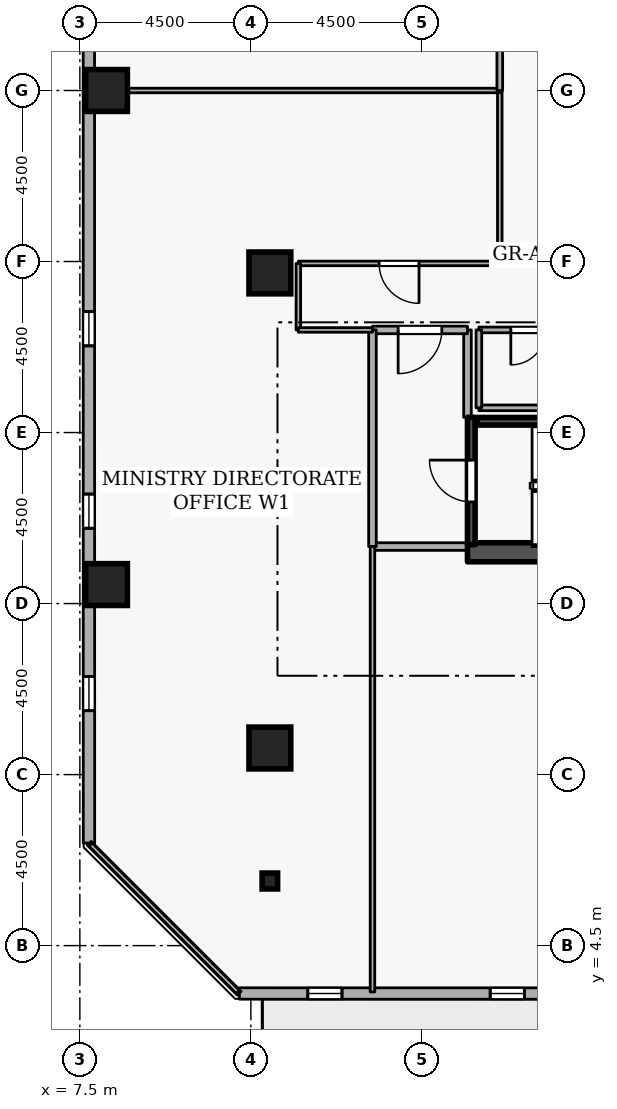
"""IFC4 building model, lengths in metres.
Left out: names, types, materials, properties, quantities, classifications, styles, units other than length and angle.
Written with IfcOpenShell. Run it as: python <this file> out.ifc"""

import sys

from ifc_helpers import new_model, si_unit, direction, frame, frame_2d, origin, origin_2d, place, context, subcontext, project, spatial, rectangle, i_section, extrude, element, fill, save


model = new_model("IFC4")
c1 = context("Model", 3, precision=1e-05, world=origin(), true_north=direction((0.0, 1.0)))
c2 = subcontext(c1, "Body", "Model", "MODEL_VIEW")
j1 = project(units=[si_unit("LENGTHUNIT", "METRE"), si_unit("PLANEANGLEUNIT", "RADIAN")], contexts=[c1])
p1 = place(None, origin())
s1 = spatial("IfcSite", under=j1, at=p1, CompositionType="ELEMENT")
p2 = place(p1, origin())
s2 = spatial("IfcBuilding", under=s1, at=p2, CompositionType="ELEMENT")
p3 = place(p2, frame((0.0, 0.0, 152.7)))
s3 = spatial("IfcBuildingStorey", under=s2, at=p3, CompositionType="ELEMENT", Elevation=152.7)
p4 = place(p3, frame((17.7, 14.85, 0.0), z_axis=(0.0, 0.0, 1.0), x_axis=(1.0, 0.0, 0.0)))
e1 = element("IfcWall", 1, at=p4, inside=s3, PredefinedType="SHEAR", context=c2, shape_type="SweptSolid", body=[
    extrude(rectangle(XDim=15.6, YDim=0.5, at=frame_2d((7.8, 0.0))), origin(), (0.0, 0.0, 1.0), 3.6),
])
for number, where, z_axis, x_axis in (
    (2, (12.5, 9.7, 0.0), (0.0, 0.0, 1.0), (1.0, 0.0, 0.0)),
    (3, (8.2, 14.0, 0.0), (0.0, 0.0, 1.0), (1.0, 0.0, 0.0)),
    (4, (8.2, 27.0, 0.0), (0.0, 0.0, 1.0), (1.0, 0.0, 0.0)),
    (5, (12.5, 22.2, 0.0), (0.0, 0.0, 1.0), (1.0, 0.0, 0.0)),
):
    element("IfcColumn", number, at=place(p3, frame(where, z_axis=z_axis, x_axis=x_axis)), inside=s3, PredefinedType="COLUMN", context=c2, shape_type="SweptSolid", body=[
        extrude(rectangle(XDim=1.1, YDim=1.1, at=origin_2d()), origin(), (0.0, 0.0, 1.0), 3.6),
    ])
p5 = place(p3, frame((12.5, 6.2, 0.0), z_axis=(0.0, 0.0, 1.0), x_axis=(1.0, 0.0, 0.0)))
e6 = element("IfcColumn", 6, at=p5, inside=s3, PredefinedType="COLUMN", context=c2, shape_type="SweptSolid", body=[
    extrude(i_section(OverallWidth=0.407, OverallDepth=0.419, WebThickness=0.031, FlangeThickness=0.049, FilletRadius=0.015, at=origin_2d()), origin(), (0.0, 0.0, 1.0), 3.6),
])
p6 = place(p3, frame((11.698, 3.24, 0.0), z_axis=(0.0, 0.0, 1.0), x_axis=(0.999999991209, -0.000132597301, 0.0)))
e7 = element("IfcWall", 7, at=p6, inside=s3, PredefinedType="STANDARD", context=c2, shape_type="SweptSolid", body=[
    extrude(rectangle(XDim=34.983, YDim=0.3, at=frame_2d((17.492, 0.0))), origin(), (0.0, 0.0, 1.0), 2.7),
])
p7 = place(p6, frame((21.992, 0.0, 0.0)))
e8 = element("IfcOpeningElement", 8, at=p7, cuts=e7, PredefinedType="OPENING", context=c2, shape_type="SweptSolid", body=[
    extrude(rectangle(XDim=1.0, YDim=2.08, at=frame_2d((0.5, 1.04))), frame((0.0, 0.16, 0.0), z_axis=(0.0, -1.0, 0.0), x_axis=(1.0, 0.0, 0.0)), (0.0, 0.0, 1.0), 0.32),
])
p8 = place(p6, frame((1.8, 0.0, 0.72)))
e9 = element("IfcOpeningElement", 9, at=p8, cuts=e7, PredefinedType="OPENING", context=c2, shape_type="SweptSolid", body=[
    extrude(rectangle(XDim=0.9, YDim=1.75, at=frame_2d((0.45, 0.875))), frame((0.0, 0.16, 0.0), z_axis=(0.0, -1.0, 0.0), x_axis=(1.0, 0.0, 0.0)), (0.0, 0.0, 1.0), 0.32),
])
p9 = place(p6, frame((6.6, 0.0, 0.72)))
e10 = element("IfcOpeningElement", 10, at=p9, cuts=e7, PredefinedType="OPENING", context=c2, shape_type="SweptSolid", body=[
    extrude(rectangle(XDim=0.9, YDim=1.75, at=frame_2d((0.45, 0.875))), frame((0.0, 0.16, 0.0), z_axis=(0.0, -1.0, 0.0), x_axis=(1.0, 0.0, 0.0)), (0.0, 0.0, 1.0), 0.32),
])
p10 = place(p6, frame((11.4, 0.0, 0.72)))
e11 = element("IfcOpeningElement", 11, at=p10, cuts=e7, PredefinedType="OPENING", context=c2, shape_type="SweptSolid", body=[
    extrude(rectangle(XDim=0.9, YDim=1.75, at=frame_2d((0.45, 0.875))), frame((0.0, 0.16, 0.0), z_axis=(0.0, -1.0, 0.0), x_axis=(1.0, 0.0, 0.0)), (0.0, 0.0, 1.0), 0.32),
])
p11 = place(p6, frame((16.2, 0.0, 0.72)))
e12 = element("IfcOpeningElement", 12, at=p11, cuts=e7, PredefinedType="OPENING", context=c2, shape_type="SweptSolid", body=[
    extrude(rectangle(XDim=0.9, YDim=1.75, at=frame_2d((0.45, 0.875))), frame((0.0, 0.16, 0.0), z_axis=(0.0, -1.0, 0.0), x_axis=(1.0, 0.0, 0.0)), (0.0, 0.0, 1.0), 0.32),
])
p12 = place(p6, frame((25.8, 0.0, 0.72)))
e13 = element("IfcOpeningElement", 13, at=p12, cuts=e7, PredefinedType="OPENING", context=c2, shape_type="SweptSolid", body=[
    extrude(rectangle(XDim=0.9, YDim=1.75, at=frame_2d((0.45, 0.875))), frame((0.0, 0.16, 0.0), z_axis=(0.0, -1.0, 0.0), x_axis=(1.0, 0.0, 0.0)), (0.0, 0.0, 1.0), 0.32),
])
p13 = place(p6, frame((30.6, 0.0, 0.72)))
e14 = element("IfcOpeningElement", 14, at=p13, cuts=e7, PredefinedType="OPENING", context=c2, shape_type="SweptSolid", body=[
    extrude(rectangle(XDim=0.9, YDim=1.75, at=frame_2d((0.45, 0.875))), frame((0.0, 0.16, 0.0), z_axis=(0.0, -1.0, 0.0), x_axis=(1.0, 0.0, 0.0)), (0.0, 0.0, 1.0), 0.32),
])
p14 = place(p3, frame((7.735, 42.181, 0.0), z_axis=(0.0, 0.0, 1.0), x_axis=(0.000132597301, -0.999999991209, 0.0)))
e15 = element("IfcWall", 15, at=p14, inside=s3, PredefinedType="STANDARD", context=c2, shape_type="SweptSolid", body=[
    extrude(rectangle(XDim=34.983, YDim=0.3, at=frame_2d((17.492, 0.0))), origin(), (0.0, 0.0, 1.0), 2.7),
])
p15 = place(p14, frame((6.6, 0.0, 0.72)))
e16 = element("IfcOpeningElement", 16, at=p15, cuts=e15, PredefinedType="OPENING", context=c2, shape_type="SweptSolid", body=[
    extrude(rectangle(XDim=0.9, YDim=1.75, at=frame_2d((0.45, 0.875))), frame((0.0, 0.16, 0.0), z_axis=(0.0, -1.0, 0.0), x_axis=(1.0, 0.0, 0.0)), (0.0, 0.0, 1.0), 0.32),
])
p16 = place(p14, frame((11.4, 0.0, 0.72)))
e17 = element("IfcOpeningElement", 17, at=p16, cuts=e15, PredefinedType="OPENING", context=c2, shape_type="SweptSolid", body=[
    extrude(rectangle(XDim=0.9, YDim=1.75, at=frame_2d((0.45, 0.875))), frame((0.0, 0.16, 0.0), z_axis=(0.0, -1.0, 0.0), x_axis=(1.0, 0.0, 0.0)), (0.0, 0.0, 1.0), 0.32),
])
p17 = place(p14, frame((21.0, 0.0, 0.72)))
e18 = element("IfcOpeningElement", 18, at=p17, cuts=e15, PredefinedType="OPENING", context=c2, shape_type="SweptSolid", body=[
    extrude(rectangle(XDim=0.9, YDim=1.75, at=frame_2d((0.45, 0.875))), frame((0.0, 0.16, 0.0), z_axis=(0.0, -1.0, 0.0), x_axis=(1.0, 0.0, 0.0)), (0.0, 0.0, 1.0), 0.32),
])
p18 = place(p14, frame((25.8, 0.0, 0.72)))
e19 = element("IfcOpeningElement", 19, at=p18, cuts=e15, PredefinedType="OPENING", context=c2, shape_type="SweptSolid", body=[
    extrude(rectangle(XDim=0.9, YDim=1.75, at=frame_2d((0.45, 0.875))), frame((0.0, 0.16, 0.0), z_axis=(0.0, -1.0, 0.0), x_axis=(1.0, 0.0, 0.0)), (0.0, 0.0, 1.0), 0.32),
])
p19 = place(p14, frame((30.6, 0.0, 0.72)))
e20 = element("IfcOpeningElement", 20, at=p19, cuts=e15, PredefinedType="OPENING", context=c2, shape_type="SweptSolid", body=[
    extrude(rectangle(XDim=0.9, YDim=1.75, at=frame_2d((0.45, 0.875))), frame((0.0, 0.16, 0.0), z_axis=(0.0, -1.0, 0.0), x_axis=(1.0, 0.0, 0.0)), (0.0, 0.0, 1.0), 0.32),
])
p20 = place(p3, frame((17.8, 15.05, 0.0), z_axis=(0.0, 0.0, 1.0), x_axis=(0.0, 1.0, 0.0)))
e21 = element("IfcWall", 21, at=p20, inside=s3, PredefinedType="SHEAR", context=c2, shape_type="SweptSolid", body=[
    extrude(rectangle(XDim=3.35, YDim=0.2, at=frame_2d((1.675, 0.0))), origin(), (0.0, 0.0, 1.0), 3.6),
])
p21 = place(p20, frame((1.125, 0.0, 0.0)))
e22 = element("IfcOpeningElement", 22, at=p21, cuts=e21, PredefinedType="OPENING", context=c2, shape_type="SweptSolid", body=[
    extrude(rectangle(XDim=1.1, YDim=2.1, at=frame_2d((0.55, 1.05))), frame((0.0, 0.11, 0.0), z_axis=(0.0, -1.0, 0.0), x_axis=(1.0, 0.0, 0.0)), (0.0, 0.0, 1.0), 0.22),
])
p22 = place(p3, frame((25.05, 18.297, 0.0), z_axis=(0.0, 0.0, 1.0), x_axis=(-1.0, 0.0, 0.0)))
e23 = element("IfcWall", 23, at=p22, inside=s3, PredefinedType="SHEAR", context=c2, shape_type="SweptSolid", body=[
    extrude(rectangle(XDim=7.1, YDim=0.2, at=frame_2d((3.55, 0.0))), origin(), (0.0, 0.0, 1.0), 3.6),
])
p23 = place(p3, frame((15.2, 15.0, 0.0), z_axis=(0.0, 0.0, 1.0), x_axis=(1.0, 0.0, 0.0)))
e24 = element("IfcWall", 24, at=p23, inside=s3, PredefinedType="STANDARD", context=c2, shape_type="SweptSolid", body=[
    extrude(rectangle(XDim=2.5, YDim=0.2, at=frame_2d((1.25, 0.0))), origin(), (0.0, 0.0, 1.0), 3.34),
])
p24 = place(p3, frame((17.7, 18.4, 0.0), z_axis=(0.0, 0.0, 1.0), x_axis=(0.0, 1.0, 0.0)))
e25 = element("IfcWall", 25, at=p24, inside=s3, PredefinedType="STANDARD", context=c2, shape_type="SweptSolid", body=[
    extrude(rectangle(XDim=2.3, YDim=0.2, at=frame_2d((1.15, 0.0))), origin(), (0.0, 0.0, 1.0), 2.545),
])
p25 = place(p3, frame((17.7, 20.7, 0.0), z_axis=(0.0, 0.0, 1.0), x_axis=(-1.0, 0.0, 0.0)))
e26 = element("IfcWall", 26, at=p25, inside=s3, PredefinedType="STANDARD", context=c2, shape_type="SweptSolid", body=[
    extrude(rectangle(XDim=2.5, YDim=0.2, at=frame_2d((1.25, 0.0))), origin(), (0.0, 0.0, 1.0), 3.34),
])
p26 = place(p25, frame((0.675, 0.0, 0.0)))
e27 = element("IfcOpeningElement", 27, at=p26, cuts=e26, PredefinedType="OPENING", context=c2, shape_type="SweptSolid", body=[
    extrude(rectangle(XDim=1.15, YDim=2.1, at=frame_2d((0.575, 1.05))), frame((0.0, 0.11, 0.0), z_axis=(0.0, -1.0, 0.0), x_axis=(1.0, 0.0, 0.0)), (0.0, 0.0, 1.0), 0.22),
])
p27 = place(p3, frame((15.2, 20.7, 0.0), z_axis=(0.0, 0.0, 1.0), x_axis=(0.0, -1.0, 0.0)))
e28 = element("IfcWall", 28, at=p27, inside=s3, PredefinedType="STANDARD", context=c2, shape_type="SweptSolid", body=[
    extrude(rectangle(XDim=5.7, YDim=0.2, at=frame_2d((2.85, 0.0))), origin(), (0.0, 0.0, 1.0), 3.34),
])
p28 = place(p3, frame((18.0, 18.65, 0.0), z_axis=(0.0, 0.0, 1.0), x_axis=(1.0, 0.0, 0.0)))
e29 = element("IfcWall", 29, at=p28, inside=s3, PredefinedType="PARTITIONING", context=c2, shape_type="SweptSolid", body=[
    extrude(rectangle(XDim=2.6, YDim=0.15, at=frame_2d((1.3, 0.0))), origin(), (0.0, 0.0, 1.0), 3.34),
])
p29 = place(p3, frame((20.6, 20.7, 0.0), z_axis=(0.0, 0.0, 1.0), x_axis=(-1.0, 0.0, 0.0)))
e30 = element("IfcWall", 30, at=p29, inside=s3, PredefinedType="PARTITIONING", context=c2, shape_type="SweptSolid", body=[
    extrude(rectangle(XDim=2.6, YDim=0.15, at=frame_2d((1.3, 0.0))), origin(), (0.0, 0.0, 1.0), 3.34),
])
p30 = place(p29, frame((0.84, 0.0, 0.0)))
e31 = element("IfcOpeningElement", 31, at=p30, cuts=e30, PredefinedType="OPENING", context=c2, shape_type="SweptSolid", body=[
    extrude(rectangle(XDim=0.92, YDim=2.08, at=frame_2d((0.46, 1.04))), frame((0.0, 0.085, 0.0), z_axis=(0.0, -1.0, 0.0), x_axis=(1.0, 0.0, 0.0)), (0.0, 0.0, 1.0), 0.17),
])
p31 = place(p3, frame((18.0, 20.7, 0.0), z_axis=(0.0, 0.0, 1.0), x_axis=(0.0, -1.0, 0.0)))
e32 = element("IfcWall", 32, at=p31, inside=s3, PredefinedType="PARTITIONING", context=c2, shape_type="SweptSolid", body=[
    extrude(rectangle(XDim=2.05, YDim=0.15, at=frame_2d((1.025, 0.0))), origin(), (0.0, 0.0, 1.0), 2.545),
])
p32 = place(p3, frame((18.55, 27.0, 0.0), z_axis=(0.0, 0.0, 1.0), x_axis=(0.0, -1.0, 0.0)))
e33 = element("IfcWall", 33, at=p32, inside=s3, PredefinedType="PARTITIONING", context=c2, shape_type="SweptSolid", body=[
    extrude(rectangle(XDim=4.55, YDim=0.12, at=frame_2d((2.275, 0.0))), origin(), (0.0, 0.0, 1.0), 3.34),
])
p33 = place(p3, frame((18.55, 22.45, 0.0), z_axis=(0.0, 0.0, 1.0), x_axis=(-1.0, 0.0, 0.0)))
e34 = element("IfcWall", 34, at=p33, inside=s3, PredefinedType="PARTITIONING", context=c2, shape_type="SweptSolid", body=[
    extrude(rectangle(XDim=5.3, YDim=0.12, at=frame_2d((2.65, 0.0))), origin(), (0.0, 0.0, 1.0), 3.34),
])
p34 = place(p33, frame((2.125, 0.0, 0.0)))
e35 = element("IfcOpeningElement", 35, at=p34, cuts=e34, PredefinedType="OPENING", context=c2, shape_type="SweptSolid", body=[
    extrude(rectangle(XDim=1.05, YDim=2.1, at=frame_2d((0.525, 1.05))), frame((0.0, 0.07, 0.0), z_axis=(0.0, -1.0, 0.0), x_axis=(1.0, 0.0, 0.0)), (0.0, 0.0, 1.0), 0.14),
])
p35 = place(p3, frame((13.25, 22.45, 0.0), z_axis=(0.0, 0.0, 1.0), x_axis=(0.0, -1.0, 0.0)))
e36 = element("IfcWall", 36, at=p35, inside=s3, PredefinedType="PARTITIONING", context=c2, shape_type="SweptSolid", body=[
    extrude(rectangle(XDim=1.75, YDim=0.12, at=frame_2d((0.875, 0.0))), origin(), (0.0, 0.0, 1.0), 3.34),
])
p36 = place(p3, frame((13.25, 20.7, 0.0), z_axis=(0.0, 0.0, 1.0), x_axis=(1.0, 0.0, 0.0)))
e37 = element("IfcWall", 37, at=p36, inside=s3, PredefinedType="PARTITIONING", context=c2, shape_type="SweptSolid", body=[
    extrude(rectangle(XDim=1.95, YDim=0.12, at=frame_2d((0.975, 0.0))), origin(), (0.0, 0.0, 1.0), 3.34),
])
p37 = place(p3, frame((15.2, 15.0, 0.0), z_axis=(0.0, 0.0, 1.0), x_axis=(0.0, -1.0, 0.0)))
e38 = element("IfcWall", 38, at=p37, inside=s3, PredefinedType="PARTITIONING", context=c2, shape_type="SweptSolid", body=[
    extrude(rectangle(XDim=11.72, YDim=0.12, at=frame_2d((5.86, 0.0))), origin(), (0.0, 0.0, 1.0), 3.34),
])
p38 = place(p3, frame((11.66, 3.28, 0.0), z_axis=(0.0, 0.0, 1.0), x_axis=(-0.707106781187, 0.707106781187, 0.0)))
e39 = element("IfcWall", 39, at=p38, inside=s3, PredefinedType="PARTITIONING", context=c2, shape_type="SweptSolid", body=[
    extrude(rectangle(XDim=5.487, YDim=0.12, at=frame_2d((2.743, 0.0))), origin(), (0.0, 0.0, 1.0), 3.34),
])
p39 = place(p3, frame((7.78, 27.0, 0.0), z_axis=(0.0, 0.0, 1.0), x_axis=(1.0, 0.0, 0.0)))
e40 = element("IfcWall", 40, at=p39, inside=s3, PredefinedType="PARTITIONING", context=c2, shape_type="SweptSolid", body=[
    extrude(rectangle(XDim=10.77, YDim=0.12, at=frame_2d((5.385, 0.0))), origin(), (0.0, 0.0, 1.0), 2.932),
])
p40 = place(p3, frame((18.55, 31.55, 0.0), z_axis=(0.0, 0.0, 1.0), x_axis=(0.0, -1.0, 0.0)))
e41 = element("IfcWall", 41, at=p40, inside=s3, PredefinedType="PARTITIONING", context=c2, shape_type="SweptSolid", body=[
    extrude(rectangle(XDim=4.55, YDim=0.15, at=frame_2d((2.275, 0.0))), origin(), (0.0, 0.0, 1.0), 3.34),
])
p41 = place(p8, origin())
e42 = element("IfcWindow", 42, at=p41, inside=s3, PartitioningType="SINGLE_PANEL", PredefinedType="WINDOW", context=c2, shape_type="SweptSolid", body=[
    extrude(rectangle(XDim=0.9, YDim=1.75, at=frame_2d((0.45, 0.875))), frame((0.0, 0.03, 0.0), z_axis=(0.0, -1.0, 0.0), x_axis=(1.0, 0.0, 0.0)), (0.0, 0.0, 1.0), 0.06),
])
fill(e9, e42)
p42 = place(p9, origin())
e43 = element("IfcWindow", 43, at=p42, inside=s3, PartitioningType="SINGLE_PANEL", PredefinedType="WINDOW", context=c2, shape_type="SweptSolid", body=[
    extrude(rectangle(XDim=0.9, YDim=1.75, at=frame_2d((0.45, 0.875))), frame((0.0, 0.03, 0.0), z_axis=(0.0, -1.0, 0.0), x_axis=(1.0, 0.0, 0.0)), (0.0, 0.0, 1.0), 0.06),
])
fill(e10, e43)
p43 = place(p17, origin())
e44 = element("IfcWindow", 44, at=p43, inside=s3, PartitioningType="SINGLE_PANEL", PredefinedType="WINDOW", context=c2, shape_type="SweptSolid", body=[
    extrude(rectangle(XDim=0.9, YDim=1.75, at=frame_2d((0.45, 0.875))), frame((0.0, 0.03, 0.0), z_axis=(0.0, -1.0, 0.0), x_axis=(1.0, 0.0, 0.0)), (0.0, 0.0, 1.0), 0.06),
])
fill(e18, e44)
p44 = place(p18, origin())
e45 = element("IfcWindow", 45, at=p44, inside=s3, PartitioningType="SINGLE_PANEL", PredefinedType="WINDOW", context=c2, shape_type="SweptSolid", body=[
    extrude(rectangle(XDim=0.9, YDim=1.75, at=frame_2d((0.45, 0.875))), frame((0.0, 0.03, 0.0), z_axis=(0.0, -1.0, 0.0), x_axis=(1.0, 0.0, 0.0)), (0.0, 0.0, 1.0), 0.06),
])
fill(e19, e45)
p45 = place(p19, origin())
e46 = element("IfcWindow", 46, at=p45, inside=s3, PartitioningType="SINGLE_PANEL", PredefinedType="WINDOW", context=c2, shape_type="SweptSolid", body=[
    extrude(rectangle(XDim=0.9, YDim=1.75, at=frame_2d((0.45, 0.875))), frame((0.0, 0.03, 0.0), z_axis=(0.0, -1.0, 0.0), x_axis=(1.0, 0.0, 0.0)), (0.0, 0.0, 1.0), 0.06),
])
fill(e20, e46)
p46 = place(p21, origin())
e47 = element("IfcDoor", 47, at=p46, inside=s3, OperationType="SINGLE_SWING_RIGHT", PredefinedType="DOOR", context=c2, shape_type="SweptSolid", body=[
    extrude(rectangle(XDim=1.1, YDim=2.1, at=frame_2d((0.55, 1.05))), frame((0.0, 0.025, 0.0), z_axis=(0.0, -1.0, 0.0), x_axis=(1.0, 0.0, 0.0)), (0.0, 0.0, 1.0), 0.05),
])
fill(e22, e47)
p47 = place(p26, origin())
e48 = element("IfcDoor", 48, at=p47, inside=s3, OperationType="SINGLE_SWING_RIGHT", PredefinedType="DOOR", context=c2, shape_type="SweptSolid", body=[
    extrude(rectangle(XDim=1.15, YDim=2.1, at=frame_2d((0.575, 1.05))), frame((0.0, 0.025, 0.0), z_axis=(0.0, -1.0, 0.0), x_axis=(1.0, 0.0, 0.0)), (0.0, 0.0, 1.0), 0.05),
])
fill(e27, e48)
p48 = place(p30, origin())
e49 = element("IfcDoor", 49, at=p48, inside=s3, OperationType="SINGLE_SWING_RIGHT", PredefinedType="DOOR", context=c2, shape_type="SweptSolid", body=[
    extrude(rectangle(XDim=0.92, YDim=2.08, at=frame_2d((0.46, 1.04))), frame((0.0, 0.025, 0.0), z_axis=(0.0, -1.0, 0.0), x_axis=(1.0, 0.0, 0.0)), (0.0, 0.0, 1.0), 0.05),
])
fill(e31, e49)
p49 = place(p34, origin())
e50 = element("IfcDoor", 50, at=p49, inside=s3, OperationType="SINGLE_SWING_LEFT", PredefinedType="DOOR", context=c2, shape_type="SweptSolid", body=[
    extrude(rectangle(XDim=1.05, YDim=2.1, at=frame_2d((0.525, 1.05))), frame((0.0, 0.025, 0.0), z_axis=(0.0, -1.0, 0.0), x_axis=(1.0, 0.0, 0.0)), (0.0, 0.0, 1.0), 0.05),
])
fill(e35, e50)
save(model, sys.argv[1])
